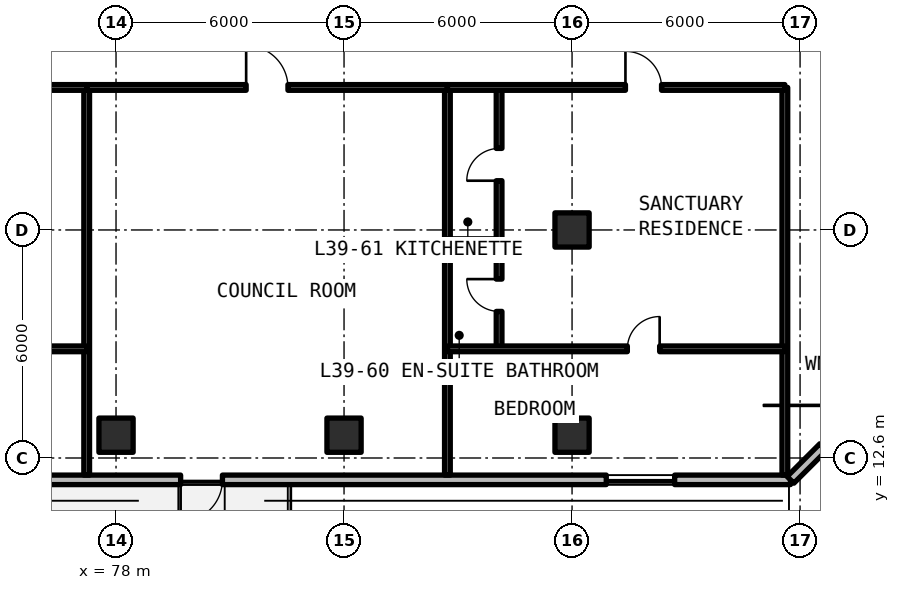
"""IFC4 building model, lengths in metres.
Left out: names, types, materials, properties, quantities, classifications, styles, units other than length and angle.
Written with IfcOpenShell. Run it as: python <this file> out.ifc"""

import sys

from ifc_helpers import new_model, si_unit, direction, frame, frame_2d, origin, origin_2d, place, context, subcontext, project, spatial, rectangle, extrude, element, fill, save


model = new_model("IFC4")
c1 = context("Model", 3, precision=1e-05, world=origin(), true_north=direction((0.0, 1.0)))
c2 = subcontext(c1, "Body", "Model", "MODEL_VIEW")
j1 = project(units=[si_unit("LENGTHUNIT", "METRE"), si_unit("PLANEANGLEUNIT", "RADIAN")], contexts=[c1])
p1 = place(None, origin())
s1 = spatial("IfcSite", under=j1, at=p1, CompositionType="ELEMENT")
p2 = place(p1, origin())
s2 = spatial("IfcBuilding", under=s1, at=p2, CompositionType="ELEMENT")
p3 = place(p2, frame((0.0, 0.0, 141.9)))
s3 = spatial("IfcBuildingStorey", under=s2, at=p3, CompositionType="ELEMENT", Elevation=141.9)
for number, where, z_axis, x_axis in (
    (1, (90.0, 18.6, 0.0), (0.0, 0.0, 1.0), (1.0, 0.0, 0.0)),
    (2, (78.0, 13.2, 0.0), (0.0, 0.0, 1.0), (1.0, 0.0, 0.0)),
    (3, (84.0, 13.2, 0.0), (0.0, 0.0, 1.0), (1.0, 0.0, 0.0)),
    (4, (90.0, 13.2, 0.0), (0.0, 0.0, 1.0), (1.0, 0.0, 0.0)),
):
    element("IfcColumn", number, at=place(p3, frame(where, z_axis=z_axis, x_axis=x_axis)), inside=s3, PredefinedType="COLUMN", context=c2, shape_type="SweptSolid", body=[
        extrude(rectangle(XDim=0.9, YDim=0.9, at=origin_2d()), origin(), (0.0, 0.0, 1.0), 3.3),
    ])
p4 = place(p3, frame((52.125, 12.025, 0.0), z_axis=(0.0, 0.0, 1.0), x_axis=(1.0, 0.0, 0.0)))
e5 = element("IfcWall", 5, at=p4, inside=s3, PredefinedType="SOLIDWALL", context=c2, shape_type="SweptSolid", body=[
    extrude(rectangle(XDim=43.623, YDim=0.25, at=frame_2d((21.812, 0.0))), origin(), (0.0, 0.0, 1.0), 3.08),
])
p5 = place(p4, frame((10.975, 0.0, 0.0)))
e6 = element("IfcOpeningElement", 6, at=p5, cuts=e5, PredefinedType="OPENING", context=c2, shape_type="SweptSolid", body=[
    extrude(rectangle(XDim=1.1, YDim=2.15, at=frame_2d((0.55, 1.075))), frame((0.0, 0.135, 0.0), z_axis=(0.0, -1.0, 0.0), x_axis=(1.0, 0.0, 0.0)), (0.0, 0.0, 1.0), 0.27),
])
p6 = place(p4, frame((27.575, 0.0, 0.0)))
e7 = element("IfcOpeningElement", 7, at=p6, cuts=e5, PredefinedType="OPENING", context=c2, shape_type="SweptSolid", body=[
    extrude(rectangle(XDim=1.1, YDim=2.15, at=frame_2d((0.55, 1.075))), frame((0.0, 0.135, 0.0), z_axis=(0.0, -1.0, 0.0), x_axis=(1.0, 0.0, 0.0)), (0.0, 0.0, 1.0), 0.27),
])
p7 = place(p4, frame((2.769, 0.0, 0.78)))
e8 = element("IfcOpeningElement", 8, at=p7, cuts=e5, PredefinedType="OPENING", context=c2, shape_type="SweptSolid", body=[
    extrude(rectangle(XDim=1.8, YDim=1.66, at=frame_2d((0.9, 0.83))), frame((0.0, 0.135, 0.0), z_axis=(0.0, -1.0, 0.0), x_axis=(1.0, 0.0, 0.0)), (0.0, 0.0, 1.0), 0.27),
])
p8 = place(p4, frame((20.723, 0.0, 0.78)))
e9 = element("IfcOpeningElement", 9, at=p8, cuts=e5, PredefinedType="OPENING", context=c2, shape_type="SweptSolid", body=[
    extrude(rectangle(XDim=1.8, YDim=1.66, at=frame_2d((0.9, 0.83))), frame((0.0, 0.135, 0.0), z_axis=(0.0, -1.0, 0.0), x_axis=(1.0, 0.0, 0.0)), (0.0, 0.0, 1.0), 0.27),
])
p9 = place(p4, frame((38.775, 0.0, 0.78)))
e10 = element("IfcOpeningElement", 10, at=p9, cuts=e5, PredefinedType="OPENING", context=c2, shape_type="SweptSolid", body=[
    extrude(rectangle(XDim=1.8, YDim=1.66, at=frame_2d((0.9, 0.83))), frame((0.0, 0.135, 0.0), z_axis=(0.0, -1.0, 0.0), x_axis=(1.0, 0.0, 0.0)), (0.0, 0.0, 1.0), 0.27),
])
p10 = place(p3, frame((95.748, 12.025, 0.0), z_axis=(0.0, 0.0, 1.0), x_axis=(0.70708586489, 0.707127696864, 0.0)))
e11 = element("IfcWall", 11, at=p10, inside=s3, PredefinedType="SOLIDWALL", context=c2, shape_type="SweptSolid", body=[
    extrude(rectangle(XDim=5.836, YDim=0.25, at=frame_2d((2.918, 0.0))), origin(), (0.0, 0.0, 1.0), 3.08),
])
p11 = place(p10, frame((1.218, 0.0, 0.78)))
e12 = element("IfcOpeningElement", 12, at=p11, cuts=e11, PredefinedType="OPENING", context=c2, shape_type="SweptSolid", body=[
    extrude(rectangle(XDim=3.4, YDim=1.66, at=frame_2d((1.7, 0.83))), frame((0.0, 0.135, 0.0), z_axis=(0.0, -1.0, 0.0), x_axis=(1.0, 0.0, 0.0)), (0.0, 0.0, 1.0), 0.27),
])
for number, where, z_axis, x_axis in (
    (13, (95.6, 12.15, 0.0), (0.0, 0.0, 1.0), (0.0, 1.0, 0.0)),
    (14, (77.228, 12.15, 0.0), (0.0, 0.0, 1.0), (0.0, 1.0, 0.0)),
):
    element("IfcWall", number, at=place(p3, frame(where, z_axis=z_axis, x_axis=x_axis)), inside=s3, PredefinedType="SOLIDWALL", context=c2, shape_type="SweptSolid", body=[
        extrude(rectangle(XDim=10.2, YDim=0.15, at=frame_2d((5.1, 0.0))), origin(), (0.0, 0.0, 1.0), 2.35),
    ])
p12 = place(p3, frame((68.348, 15.472, 0.0), z_axis=(0.0, 0.0, 1.0), x_axis=(1.0, 0.0, 0.0)))
e15 = element("IfcWall", 15, at=p12, inside=s3, PredefinedType="PARTITIONING", context=c2, shape_type="SweptSolid", body=[
    extrude(rectangle(XDim=8.88, YDim=0.15, at=frame_2d((4.44, 0.0))), origin(), (0.0, 0.0, 1.0), 2.35),
])
p13 = place(p12, frame((4.921, 0.0, 0.0)))
e16 = element("IfcOpeningElement", 16, at=p13, cuts=e15, PredefinedType="OPENING", context=c2, shape_type="SweptSolid", body=[
    extrude(rectangle(XDim=0.85, YDim=2.1, at=frame_2d((0.425, 1.05))), frame((0.0, 0.085, 0.0), z_axis=(0.0, -1.0, 0.0), x_axis=(1.0, 0.0, 0.0)), (0.0, 0.0, 1.0), 0.17),
])
p14 = place(p3, frame((68.348, 22.35, 0.0), z_axis=(0.0, 0.0, 1.0), x_axis=(1.0, 0.0, 0.0)))
e17 = element("IfcWall", 17, at=p14, inside=s3, PredefinedType="SOLIDWALL", context=c2, shape_type="SweptSolid", body=[
    extrude(rectangle(XDim=8.88, YDim=0.15, at=frame_2d((4.44, 0.0))), origin(), (0.0, 0.0, 1.0), 2.35),
])
p15 = place(p14, frame((4.871, 0.0, 0.0)))
e18 = element("IfcOpeningElement", 18, at=p15, cuts=e17, PredefinedType="OPENING", context=c2, shape_type="SweptSolid", body=[
    extrude(rectangle(XDim=0.95, YDim=2.15, at=frame_2d((0.475, 1.075))), frame((0.0, 0.085, 0.0), z_axis=(0.0, -1.0, 0.0), x_axis=(1.0, 0.0, 0.0)), (0.0, 0.0, 1.0), 0.17),
])
p16 = place(p3, frame((86.72, 12.15, 0.0), z_axis=(0.0, 0.0, 1.0), x_axis=(0.0, 1.0, 0.0)))
e19 = element("IfcWall", 19, at=p16, inside=s3, PredefinedType="SOLIDWALL", context=c2, shape_type="SweptSolid", body=[
    extrude(rectangle(XDim=10.2, YDim=0.15, at=frame_2d((5.1, 0.0))), origin(), (0.0, 0.0, 1.0), 2.35),
])
p17 = place(p3, frame((77.228, 22.35, 0.0), z_axis=(0.0, 0.0, 1.0), x_axis=(1.0, 0.0, 0.0)))
e20 = element("IfcWall", 20, at=p17, inside=s3, PredefinedType="SOLIDWALL", context=c2, shape_type="SweptSolid", body=[
    extrude(rectangle(XDim=9.492, YDim=0.15, at=frame_2d((4.746, 0.0))), origin(), (0.0, 0.0, 1.0), 2.35),
])
p18 = place(p17, frame((4.196, 0.0, 0.0)))
e21 = element("IfcOpeningElement", 21, at=p18, cuts=e20, PredefinedType="OPENING", context=c2, shape_type="SweptSolid", body=[
    extrude(rectangle(XDim=1.1, YDim=2.15, at=frame_2d((0.55, 1.075))), frame((0.0, 0.085, 0.0), z_axis=(0.0, -1.0, 0.0), x_axis=(1.0, 0.0, 0.0)), (0.0, 0.0, 1.0), 0.17),
])
p19 = place(p3, frame((86.72, 18.292, 0.0), z_axis=(0.0, 0.0, 1.0), x_axis=(1.0, 0.0, 0.0)))
e22 = element("IfcWall", 22, at=p19, inside=s3, PredefinedType="PARTITIONING", context=c2, shape_type="SweptSolid", body=[
    extrude(rectangle(XDim=1.36, YDim=0.15, at=frame_2d((0.68, 0.0))), origin(), (0.0, 0.0, 1.0), 2.35),
])
p20 = place(p3, frame((88.08, 15.472, 0.0), z_axis=(0.0, 0.0, 1.0), x_axis=(0.0, 1.0, 0.0)))
e23 = element("IfcWall", 23, at=p20, inside=s3, PredefinedType="PARTITIONING", context=c2, shape_type="SweptSolid", body=[
    extrude(rectangle(XDim=6.878, YDim=0.15, at=frame_2d((3.439, 0.0))), origin(), (0.0, 0.0, 1.0), 2.35),
])
p21 = place(p20, frame((0.985, 0.0, 0.0)))
e24 = element("IfcOpeningElement", 24, at=p21, cuts=e23, PredefinedType="OPENING", context=c2, shape_type="SweptSolid", body=[
    extrude(rectangle(XDim=0.85, YDim=2.1, at=frame_2d((0.425, 1.05))), frame((0.0, 0.085, 0.0), z_axis=(0.0, -1.0, 0.0), x_axis=(1.0, 0.0, 0.0)), (0.0, 0.0, 1.0), 0.17),
])
p22 = place(p20, frame((4.424, 0.0, 0.0)))
e25 = element("IfcOpeningElement", 25, at=p22, cuts=e23, PredefinedType="OPENING", context=c2, shape_type="SweptSolid", body=[
    extrude(rectangle(XDim=0.85, YDim=2.1, at=frame_2d((0.425, 1.05))), frame((0.0, 0.085, 0.0), z_axis=(0.0, -1.0, 0.0), x_axis=(1.0, 0.0, 0.0)), (0.0, 0.0, 1.0), 0.17),
])
p23 = place(p3, frame((86.72, 15.472, 0.0), z_axis=(0.0, 0.0, 1.0), x_axis=(1.0, 0.0, 0.0)))
e26 = element("IfcWall", 26, at=p23, inside=s3, PredefinedType="PARTITIONING", context=c2, shape_type="SweptSolid", body=[
    extrude(rectangle(XDim=8.88, YDim=0.15, at=frame_2d((4.44, 0.0))), origin(), (0.0, 0.0, 1.0), 2.35),
])
p24 = place(p23, frame((4.735, 0.0, 0.0)))
e27 = element("IfcOpeningElement", 27, at=p24, cuts=e26, PredefinedType="OPENING", context=c2, shape_type="SweptSolid", body=[
    extrude(rectangle(XDim=0.85, YDim=2.1, at=frame_2d((0.425, 1.05))), frame((0.0, 0.085, 0.0), z_axis=(0.0, -1.0, 0.0), x_axis=(1.0, 0.0, 0.0)), (0.0, 0.0, 1.0), 0.17),
])
p25 = place(p3, frame((86.72, 22.35, 0.0), z_axis=(0.0, 0.0, 1.0), x_axis=(1.0, 0.0, 0.0)))
e28 = element("IfcWall", 28, at=p25, inside=s3, PredefinedType="SOLIDWALL", context=c2, shape_type="SweptSolid", body=[
    extrude(rectangle(XDim=8.88, YDim=0.15, at=frame_2d((4.44, 0.0))), origin(), (0.0, 0.0, 1.0), 2.35),
])
p26 = place(p25, frame((4.685, 0.0, 0.0)))
e29 = element("IfcOpeningElement", 29, at=p26, cuts=e28, PredefinedType="OPENING", context=c2, shape_type="SweptSolid", body=[
    extrude(rectangle(XDim=0.95, YDim=2.15, at=frame_2d((0.475, 1.075))), frame((0.0, 0.085, 0.0), z_axis=(0.0, -1.0, 0.0), x_axis=(1.0, 0.0, 0.0)), (0.0, 0.0, 1.0), 0.17),
])
p27 = place(p6, frame((1.1, 0.0, 0.0), z_axis=(0.0, 0.0, 1.0), x_axis=(-1.0, 0.0, 0.0)))
e30 = element("IfcDoor", 30, at=p27, inside=s3, OperationType="SINGLE_SWING_RIGHT", PredefinedType="DOOR", context=c2, shape_type="SweptSolid", body=[
    extrude(rectangle(XDim=1.1, YDim=2.15, at=frame_2d((0.55, 1.075))), frame((0.0, 0.025, 0.0), z_axis=(0.0, -1.0, 0.0), x_axis=(1.0, 0.0, 0.0)), (0.0, 0.0, 1.0), 0.05),
])
fill(e7, e30)
p28 = place(p9, origin())
e31 = element("IfcWindow", 31, at=p28, inside=s3, PartitioningType="SINGLE_PANEL", PredefinedType="WINDOW", context=c2, shape_type="SweptSolid", body=[
    extrude(rectangle(XDim=1.8, YDim=1.66, at=frame_2d((0.9, 0.83))), frame((0.0, 0.03, 0.0), z_axis=(0.0, -1.0, 0.0), x_axis=(1.0, 0.0, 0.0)), (0.0, 0.0, 1.0), 0.06),
])
fill(e10, e31)
p29 = place(p18, origin())
e32 = element("IfcDoor", 32, at=p29, inside=s3, OperationType="SINGLE_SWING_LEFT", PredefinedType="DOOR", context=c2, shape_type="SweptSolid", body=[
    extrude(rectangle(XDim=1.1, YDim=2.15, at=frame_2d((0.55, 1.075))), frame((0.0, 0.025, 0.0), z_axis=(0.0, -1.0, 0.0), x_axis=(1.0, 0.0, 0.0)), (0.0, 0.0, 1.0), 0.05),
])
fill(e21, e32)
p30 = place(p21, origin())
e33 = element("IfcDoor", 33, at=p30, inside=s3, OperationType="SINGLE_SWING_RIGHT", PredefinedType="DOOR", context=c2, shape_type="SweptSolid", body=[
    extrude(rectangle(XDim=0.85, YDim=2.1, at=frame_2d((0.425, 1.05))), frame((0.0, 0.025, 0.0), z_axis=(0.0, -1.0, 0.0), x_axis=(1.0, 0.0, 0.0)), (0.0, 0.0, 1.0), 0.05),
])
fill(e24, e33)
p31 = place(p22, origin())
e34 = element("IfcDoor", 34, at=p31, inside=s3, OperationType="SINGLE_SWING_LEFT", PredefinedType="DOOR", context=c2, shape_type="SweptSolid", body=[
    extrude(rectangle(XDim=0.85, YDim=2.1, at=frame_2d((0.425, 1.05))), frame((0.0, 0.025, 0.0), z_axis=(0.0, -1.0, 0.0), x_axis=(1.0, 0.0, 0.0)), (0.0, 0.0, 1.0), 0.05),
])
fill(e25, e34)
p32 = place(p24, origin())
e35 = element("IfcDoor", 35, at=p32, inside=s3, OperationType="SINGLE_SWING_RIGHT", PredefinedType="DOOR", context=c2, shape_type="SweptSolid", body=[
    extrude(rectangle(XDim=0.85, YDim=2.1, at=frame_2d((0.425, 1.05))), frame((0.0, 0.025, 0.0), z_axis=(0.0, -1.0, 0.0), x_axis=(1.0, 0.0, 0.0)), (0.0, 0.0, 1.0), 0.05),
])
fill(e27, e35)
p33 = place(p26, origin())
e36 = element("IfcDoor", 36, at=p33, inside=s3, OperationType="SINGLE_SWING_LEFT", PredefinedType="DOOR", context=c2, shape_type="SweptSolid", body=[
    extrude(rectangle(XDim=0.95, YDim=2.15, at=frame_2d((0.475, 1.075))), frame((0.0, 0.025, 0.0), z_axis=(0.0, -1.0, 0.0), x_axis=(1.0, 0.0, 0.0)), (0.0, 0.0, 1.0), 0.05),
])
fill(e29, e36)
save(model, sys.argv[1])
